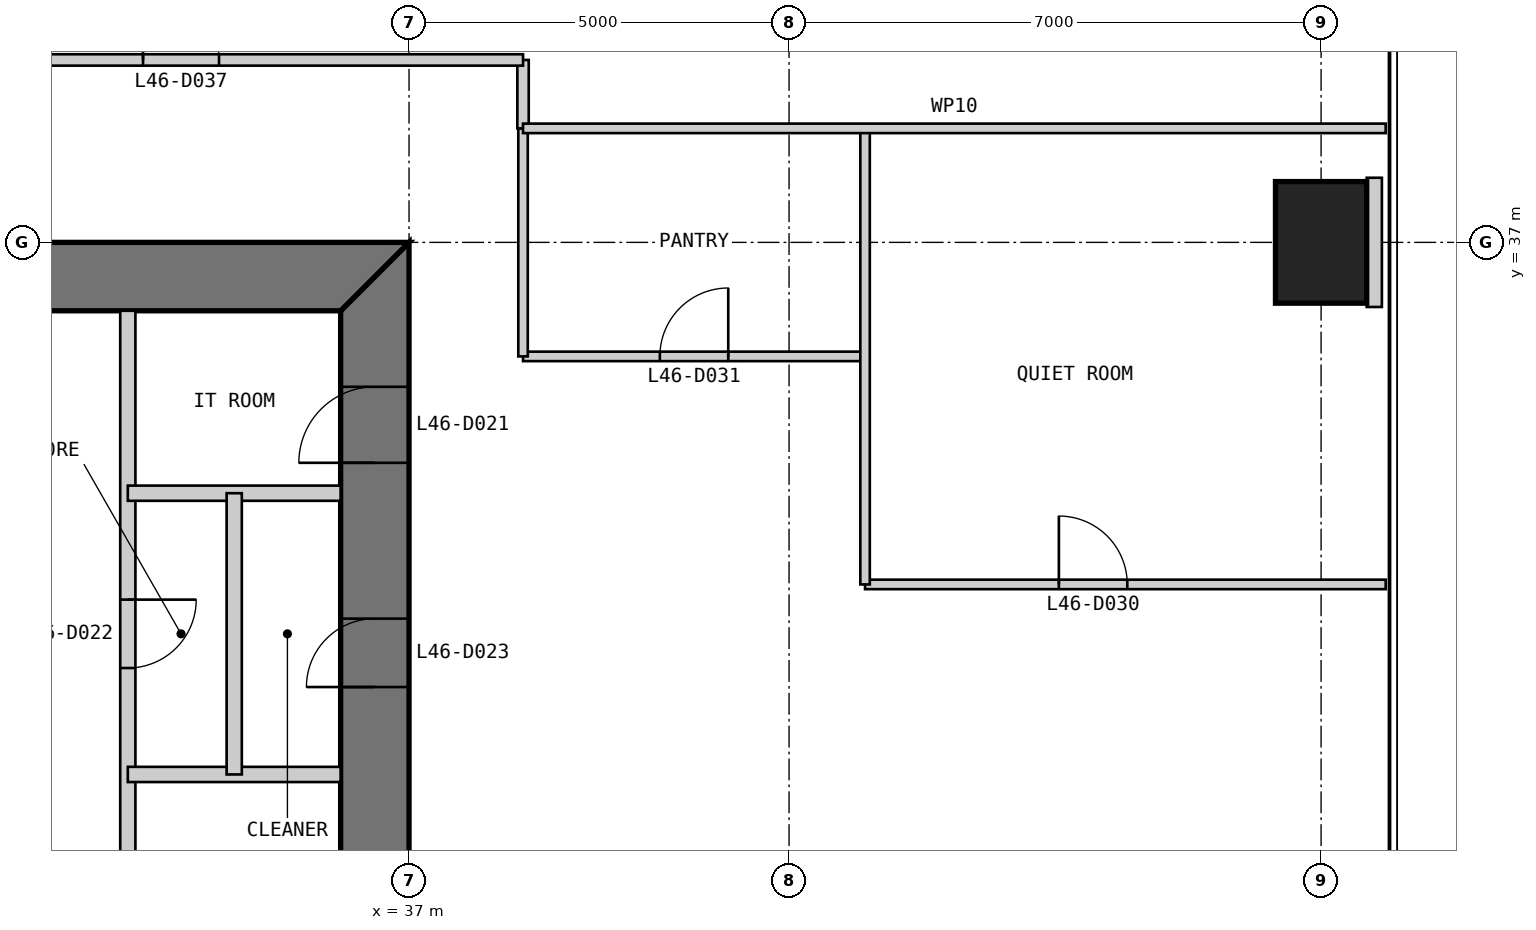
"""IFC4 building model, lengths in metres.
Left out: names, types, materials, properties, quantities, classifications, styles, units other than length and angle.
Written with IfcOpenShell. Run it as: python <this file> out.ifc"""

import sys

from ifc_helpers import new_model, si_unit, direction, frame, frame_2d, origin, origin_2d, place, context, subcontext, project, spatial, polyline, rectangle, outline, extrude, element, fill, save


model = new_model("IFC4")
c1 = context("Model", 3, precision=1e-05, world=origin(), true_north=direction((0.0, 1.0)))
c2 = subcontext(c1, "Body", "Model", "MODEL_VIEW")
j1 = project(units=[si_unit("LENGTHUNIT", "METRE"), si_unit("PLANEANGLEUNIT", "RADIAN")], contexts=[c1])
p1 = place(None, origin())
s1 = spatial("IfcSite", under=j1, at=p1, CompositionType="ELEMENT")
p2 = place(p1, origin())
s2 = spatial("IfcBuilding", under=s1, at=p2, CompositionType="ELEMENT")
p3 = place(p2, frame((0.0, 0.0, 197.8)))
s3 = spatial("IfcBuildingStorey", under=s2, at=p3, CompositionType="ELEMENT", Elevation=197.8)
p4 = place(p3, frame((49.0, 37.0, 0.0), z_axis=(0.0, 0.0, 1.0), x_axis=(1.0, 0.0, 0.0)))
e1 = element("IfcColumn", 1, at=p4, inside=s3, PredefinedType="COLUMN", context=c2, shape_type="SweptSolid", body=[
    extrude(rectangle(XDim=1.2, YDim=1.6, at=origin_2d()), origin(), (0.0, 0.0, 1.0), 4.0),
])
p5 = place(p3, frame((36.55, 13.9, 0.0), z_axis=(0.0, 0.0, 1.0), x_axis=(0.0, 1.0, 0.0)))
e2 = element("IfcWall", 2, at=p5, inside=s3, PredefinedType="SHEAR", context=c2, shape_type="SweptSolid", body=[
    extrude(outline(polyline([(-0.9, -0.45), (23.1, -0.45), (22.2, 0.45), (0.0, 0.45), (-0.9, -0.45)])), origin(), (0.0, 0.0, 1.0), 4.0),
])
p6 = place(p5, frame((20.2, 0.0, 0.0)))
e3 = element("IfcOpeningElement", 3, at=p6, cuts=e2, PredefinedType="OPENING", context=c2, shape_type="SweptSolid", body=[
    extrude(rectangle(XDim=1.0, YDim=2.2, at=frame_2d((0.5, 1.1))), frame((0.0, 0.46, 0.0), z_axis=(0.0, -1.0, 0.0), x_axis=(1.0, 0.0, 0.0)), (0.0, 0.0, 1.0), 0.92),
])
p7 = place(p5, frame((17.25, 0.0, 0.0)))
e4 = element("IfcOpeningElement", 4, at=p7, cuts=e2, PredefinedType="OPENING", context=c2, shape_type="SweptSolid", body=[
    extrude(rectangle(XDim=0.9, YDim=2.2, at=frame_2d((0.45, 1.1))), frame((0.0, 0.46, 0.0), z_axis=(0.0, -1.0, 0.0), x_axis=(1.0, 0.0, 0.0)), (0.0, 0.0, 1.0), 0.92),
])
p8 = place(p3, frame((37.0, 36.55, 0.0), z_axis=(0.0, 0.0, 1.0), x_axis=(-1.0, 0.0, 0.0)))
e5 = element("IfcWall", 5, at=p8, inside=s3, PredefinedType="SHEAR", context=c2, shape_type="SweptSolid", body=[
    extrude(outline(polyline([(0.0, -0.45), (24.0, -0.45), (23.1, 0.45), (0.9, 0.45), (0.0, -0.45)])), origin(), (0.0, 0.0, 1.0), 4.0),
])
p9 = place(p8, frame((4.9, 0.0, 0.0)))
e6 = element("IfcOpeningElement", 6, at=p9, cuts=e5, PredefinedType="OPENING", context=c2, shape_type="SweptSolid", body=[
    extrude(rectangle(XDim=1.0, YDim=2.2, at=frame_2d((0.5, 1.1))), frame((0.0, 0.46, 0.0), z_axis=(0.0, -1.0, 0.0), x_axis=(1.0, 0.0, 0.0)), (0.0, 0.0, 1.0), 0.92),
])
p10 = place(p8, frame((8.9, 0.0, 0.0)))
e7 = element("IfcOpeningElement", 7, at=p10, cuts=e5, PredefinedType="OPENING", context=c2, shape_type="SweptSolid", body=[
    extrude(rectangle(XDim=1.1, YDim=2.2, at=frame_2d((0.55, 1.1))), frame((0.0, 0.46, 0.0), z_axis=(0.0, -1.0, 0.0), x_axis=(1.0, 0.0, 0.0)), (0.0, 0.0, 1.0), 0.92),
])
p11 = place(p8, frame((15.05, 0.0, 0.0)))
e8 = element("IfcOpeningElement", 8, at=p11, cuts=e5, PredefinedType="OPENING", context=c2, shape_type="SweptSolid", body=[
    extrude(rectangle(XDim=0.9, YDim=2.2, at=frame_2d((0.45, 1.1))), frame((0.0, 0.46, 0.0), z_axis=(0.0, -1.0, 0.0), x_axis=(1.0, 0.0, 0.0)), (0.0, 0.0, 1.0), 0.92),
])
p12 = place(p8, frame((17.9, 0.0, 0.0)))
e9 = element("IfcOpeningElement", 9, at=p12, cuts=e5, PredefinedType="OPENING", context=c2, shape_type="SweptSolid", body=[
    extrude(rectangle(XDim=1.0, YDim=2.2, at=frame_2d((0.5, 1.1))), frame((0.0, 0.46, 0.0), z_axis=(0.0, -1.0, 0.0), x_axis=(1.0, 0.0, 0.0)), (0.0, 0.0, 1.0), 0.92),
])
p13 = place(p8, frame((21.4, 0.0, 0.0)))
e10 = element("IfcOpeningElement", 10, at=p13, cuts=e5, PredefinedType="OPENING", context=c2, shape_type="SweptSolid", body=[
    extrude(rectangle(XDim=1.0, YDim=2.2, at=frame_2d((0.5, 1.1))), frame((0.0, 0.46, 0.0), z_axis=(0.0, -1.0, 0.0), x_axis=(1.0, 0.0, 0.0)), (0.0, 0.0, 1.0), 0.92),
])
p14 = place(p3, frame((33.3, 36.1, 0.0), z_axis=(0.0, 0.0, 1.0), x_axis=(0.0, -1.0, 0.0)))
e11 = element("IfcWall", 11, at=p14, inside=s3, PredefinedType="PARTITIONING", context=c2, shape_type="SweptSolid", body=[
    extrude(rectangle(XDim=16.1, YDim=0.2, at=frame_2d((8.05, 0.0))), origin(), (0.0, 0.0, 1.0), 3.8),
])
p15 = place(p14, frame((3.8, 0.0, 0.0)))
e12 = element("IfcOpeningElement", 12, at=p15, cuts=e11, PredefinedType="OPENING", context=c2, shape_type="SweptSolid", body=[
    extrude(rectangle(XDim=0.9, YDim=2.2, at=frame_2d((0.45, 1.1))), frame((0.0, 0.11, 0.0), z_axis=(0.0, -1.0, 0.0), x_axis=(1.0, 0.0, 0.0)), (0.0, 0.0, 1.0), 0.22),
])
for number, where, z_axis, x_axis in (
    (13, (36.1, 30.0, 0.0), (0.0, 0.0, 1.0), (-1.0, 0.0, 0.0)),
    (14, (36.1, 33.7, 0.0), (0.0, 0.0, 1.0), (-1.0, 0.0, 0.0)),
):
    element("IfcWall", number, at=place(p3, frame(where, z_axis=z_axis, x_axis=x_axis)), inside=s3, PredefinedType="PARTITIONING", context=c2, shape_type="SweptSolid", body=[
        extrude(rectangle(XDim=2.8, YDim=0.2, at=frame_2d((1.4, 0.0))), origin(), (0.0, 0.0, 1.0), 3.8),
    ])
p16 = place(p3, frame((34.7, 33.7, 0.0), z_axis=(0.0, 0.0, 1.0), x_axis=(0.0, -1.0, 0.0)))
e15 = element("IfcWall", 15, at=p16, inside=s3, PredefinedType="PARTITIONING", context=c2, shape_type="SweptSolid", body=[
    extrude(rectangle(XDim=3.7, YDim=0.2, at=frame_2d((1.85, 0.0))), origin(), (0.0, 0.0, 1.0), 3.8),
])
p17 = place(p3, frame((49.85, 32.5, 0.0), z_axis=(0.0, 0.0, 1.0), x_axis=(-1.0, 0.0, 0.0)))
e16 = element("IfcWall", 16, at=p17, inside=s3, PredefinedType="PARTITIONING", context=c2, shape_type="SweptSolid", body=[
    extrude(rectangle(XDim=6.85, YDim=0.125, at=frame_2d((3.425, 0.0))), origin(), (0.0, 0.0, 1.0), 3.85),
])
p18 = place(p17, frame((3.4, 0.0, 0.0)))
e17 = element("IfcOpeningElement", 17, at=p18, cuts=e16, PredefinedType="OPENING", context=c2, shape_type="SweptSolid", body=[
    extrude(rectangle(XDim=0.9, YDim=2.2, at=frame_2d((0.45, 1.1))), frame((0.0, 0.073, 0.0), z_axis=(0.0, -1.0, 0.0), x_axis=(1.0, 0.0, 0.0)), (0.0, 0.0, 1.0), 0.145),
])
p19 = place(p3, frame((43.0, 35.5, 0.0), z_axis=(0.0, 0.0, 1.0), x_axis=(-1.0, 0.0, 0.0)))
e18 = element("IfcWall", 18, at=p19, inside=s3, PredefinedType="PARTITIONING", context=c2, shape_type="SweptSolid", body=[
    extrude(rectangle(XDim=4.5, YDim=0.125, at=frame_2d((2.25, 0.0))), origin(), (0.0, 0.0, 1.0), 3.85),
])
p20 = place(p19, frame((1.8, 0.0, 0.0)))
e19 = element("IfcOpeningElement", 19, at=p20, cuts=e18, PredefinedType="OPENING", context=c2, shape_type="SweptSolid", body=[
    extrude(rectangle(XDim=0.9, YDim=2.2, at=frame_2d((0.45, 1.1))), frame((0.0, 0.073, 0.0), z_axis=(0.0, -1.0, 0.0), x_axis=(1.0, 0.0, 0.0)), (0.0, 0.0, 1.0), 0.145),
])
p21 = place(p3, frame((43.0, 32.5, 0.0), z_axis=(0.0, 0.0, 1.0), x_axis=(0.0, 1.0, 0.0)))
e20 = element("IfcWall", 20, at=p21, inside=s3, PredefinedType="PARTITIONING", context=c2, shape_type="SweptSolid", body=[
    extrude(rectangle(XDim=6.0, YDim=0.125, at=frame_2d((3.0, 0.0))), origin(), (0.0, 0.0, 1.0), 3.238),
])
p22 = place(p3, frame((38.5, 35.5, 0.0), z_axis=(0.0, 0.0, 1.0), x_axis=(0.0, 1.0, 0.0)))
e21 = element("IfcWall", 21, at=p22, inside=s3, PredefinedType="PARTITIONING", context=c2, shape_type="SweptSolid", body=[
    extrude(rectangle(XDim=3.0, YDim=0.125, at=frame_2d((1.5, 0.0))), origin(), (0.0, 0.0, 1.0), 3.85),
])
p23 = place(p3, frame((38.5, 38.5, 0.0), z_axis=(0.0, 0.0, 1.0), x_axis=(0.0, 1.0, 0.0)))
e22 = element("IfcWall", 22, at=p23, inside=s3, PredefinedType="PARTITIONING", context=c2, shape_type="SweptSolid", body=[
    extrude(rectangle(XDim=0.9, YDim=0.15, at=frame_2d((0.45, 0.0))), origin(), (0.0, 0.0, 1.0), 3.85),
])
p24 = place(p3, frame((38.5, 39.4, 0.0), z_axis=(0.0, 0.0, 1.0), x_axis=(-1.0, 0.0, 0.0)))
e23 = element("IfcWall", 23, at=p24, inside=s3, PredefinedType="PARTITIONING", context=c2, shape_type="SweptSolid", body=[
    extrude(rectangle(XDim=27.9, YDim=0.15, at=frame_2d((13.95, 0.0))), origin(), (0.0, 0.0, 1.0), 3.85),
])
p25 = place(p24, frame((9.25, 0.0, 0.0)))
e24 = element("IfcOpeningElement", 24, at=p25, cuts=e23, PredefinedType="OPENING", context=c2, shape_type="SweptSolid", body=[
    extrude(rectangle(XDim=1.0, YDim=2.2, at=frame_2d((0.5, 1.1))), frame((0.0, 0.085, 0.0), z_axis=(0.0, -1.0, 0.0), x_axis=(1.0, 0.0, 0.0)), (0.0, 0.0, 1.0), 0.17),
])
p26 = place(p24, frame((16.75, 0.0, 0.0)))
e25 = element("IfcOpeningElement", 25, at=p26, cuts=e23, PredefinedType="OPENING", context=c2, shape_type="SweptSolid", body=[
    extrude(rectangle(XDim=1.0, YDim=2.2, at=frame_2d((0.5, 1.1))), frame((0.0, 0.085, 0.0), z_axis=(0.0, -1.0, 0.0), x_axis=(1.0, 0.0, 0.0)), (0.0, 0.0, 1.0), 0.17),
])
p27 = place(p24, frame((4.0, 0.0, 0.0)))
e26 = element("IfcOpeningElement", 26, at=p27, cuts=e23, PredefinedType="OPENING", context=c2, shape_type="SweptSolid", body=[
    extrude(rectangle(XDim=1.0, YDim=2.2, at=frame_2d((0.5, 1.1))), frame((0.0, 0.085, 0.0), z_axis=(0.0, -1.0, 0.0), x_axis=(1.0, 0.0, 0.0)), (0.0, 0.0, 1.0), 0.17),
])
p28 = place(p24, frame((22.0, 0.0, 0.0)))
e27 = element("IfcOpeningElement", 27, at=p28, cuts=e23, PredefinedType="OPENING", context=c2, shape_type="SweptSolid", body=[
    extrude(rectangle(XDim=1.0, YDim=2.2, at=frame_2d((0.5, 1.1))), frame((0.0, 0.085, 0.0), z_axis=(0.0, -1.0, 0.0), x_axis=(1.0, 0.0, 0.0)), (0.0, 0.0, 1.0), 0.17),
])
p29 = place(p24, frame((25.0, 0.0, 0.0)))
e28 = element("IfcOpeningElement", 28, at=p29, cuts=e23, PredefinedType="OPENING", context=c2, shape_type="SweptSolid", body=[
    extrude(rectangle(XDim=1.0, YDim=2.2, at=frame_2d((0.5, 1.1))), frame((0.0, 0.085, 0.0), z_axis=(0.0, -1.0, 0.0), x_axis=(1.0, 0.0, 0.0)), (0.0, 0.0, 1.0), 0.17),
])
p30 = place(p3, frame((49.85, 38.5, 0.0), z_axis=(0.0, 0.0, 1.0), x_axis=(-1.0, 0.0, 0.0)))
e29 = element("IfcWall", 29, at=p30, inside=s3, PredefinedType="PARTITIONING", context=c2, shape_type="SweptSolid", body=[
    extrude(rectangle(XDim=11.35, YDim=0.125, at=frame_2d((5.675, 0.0))), origin(), (0.0, 0.0, 1.0), 3.85),
])
p31 = place(p3, frame((49.8, 37.0, 0.0), z_axis=(0.0, 0.0, 1.0), x_axis=(-1.0, 0.0, 0.0)))
e30 = element("IfcWall", 30, at=p31, inside=s3, PredefinedType="PARTITIONING", context=c2, shape_type="SweptSolid", body=[
    extrude(rectangle(XDim=0.2, YDim=1.7, at=frame_2d((0.1, 0.0))), origin(), (0.0, 0.0, 1.0), 3.85),
])
p32 = place(p6, origin())
e31 = element("IfcDoor", 31, at=p32, inside=s3, OperationType="SINGLE_SWING_LEFT", PredefinedType="DOOR", context=c2, shape_type="SweptSolid", body=[
    extrude(rectangle(XDim=1.0, YDim=2.2, at=frame_2d((0.5, 1.1))), frame((0.0, 0.025, 0.0), z_axis=(0.0, -1.0, 0.0), x_axis=(1.0, 0.0, 0.0)), (0.0, 0.0, 1.0), 0.05),
    extrude(outline(polyline([(0.0, 0.0), (0.04, 0.0), (0.04, 2.16), (0.96, 2.16), (0.96, 0.0), (1.0, 0.0), (1.0, 2.2), (0.0, 2.2), (0.0, 0.0)])), frame((0.0, 0.3, 0.0), z_axis=(0.0, -1.0, 0.0), x_axis=(1.0, 0.0, 0.0)), (0.0, 0.0, 1.0), 0.6),
])
fill(e3, e31)
p33 = place(p15, origin())
e32 = element("IfcDoor", 32, at=p33, inside=s3, OperationType="SINGLE_SWING_LEFT", PredefinedType="DOOR", context=c2, shape_type="SweptSolid", body=[
    extrude(rectangle(XDim=0.9, YDim=2.2, at=frame_2d((0.45, 1.1))), frame((0.0, 0.025, 0.0), z_axis=(0.0, -1.0, 0.0), x_axis=(1.0, 0.0, 0.0)), (0.0, 0.0, 1.0), 0.05),
])
fill(e12, e32)
p34 = place(p7, origin())
e33 = element("IfcDoor", 33, at=p34, inside=s3, OperationType="SINGLE_SWING_LEFT", PredefinedType="DOOR", context=c2, shape_type="SweptSolid", body=[
    extrude(rectangle(XDim=0.9, YDim=2.2, at=frame_2d((0.45, 1.1))), frame((0.0, 0.025, 0.0), z_axis=(0.0, -1.0, 0.0), x_axis=(1.0, 0.0, 0.0)), (0.0, 0.0, 1.0), 0.05),
    extrude(outline(polyline([(0.0, 0.0), (0.04, 0.0), (0.04, 2.16), (0.86, 2.16), (0.86, 0.0), (0.9, 0.0), (0.9, 2.2), (0.0, 2.2), (0.0, 0.0)])), frame((0.0, 0.3, 0.0), z_axis=(0.0, -1.0, 0.0), x_axis=(1.0, 0.0, 0.0)), (0.0, 0.0, 1.0), 0.6),
])
fill(e4, e33)
p35 = place(p18, frame((0.9, 0.0, 0.0), z_axis=(0.0, 0.0, 1.0), x_axis=(-1.0, 0.0, 0.0)))
e34 = element("IfcDoor", 34, at=p35, inside=s3, OperationType="SINGLE_SWING_LEFT", PredefinedType="DOOR", context=c2, shape_type="SweptSolid", body=[
    extrude(rectangle(XDim=0.9, YDim=2.2, at=frame_2d((0.45, 1.1))), frame((0.0, 0.025, 0.0), z_axis=(0.0, -1.0, 0.0), x_axis=(1.0, 0.0, 0.0)), (0.0, 0.0, 1.0), 0.05),
])
fill(e17, e34)
p36 = place(p20, frame((0.9, 0.0, 0.0), z_axis=(0.0, 0.0, 1.0), x_axis=(-1.0, 0.0, 0.0)))
e35 = element("IfcDoor", 35, at=p36, inside=s3, OperationType="SINGLE_SWING_RIGHT", PredefinedType="DOOR", context=c2, shape_type="SweptSolid", body=[
    extrude(rectangle(XDim=0.9, YDim=2.2, at=frame_2d((0.45, 1.1))), frame((0.0, 0.025, 0.0), z_axis=(0.0, -1.0, 0.0), x_axis=(1.0, 0.0, 0.0)), (0.0, 0.0, 1.0), 0.05),
])
fill(e19, e35)
p37 = place(p27, frame((1.0, 0.0, 0.0), z_axis=(0.0, 0.0, 1.0), x_axis=(-1.0, 0.0, 0.0)))
e36 = element("IfcDoor", 36, at=p37, inside=s3, OperationType="SINGLE_SWING_LEFT", PredefinedType="DOOR", context=c2, shape_type="SweptSolid", body=[
    extrude(rectangle(XDim=1.0, YDim=2.2, at=frame_2d((0.5, 1.1))), frame((0.0, 0.025, 0.0), z_axis=(0.0, -1.0, 0.0), x_axis=(1.0, 0.0, 0.0)), (0.0, 0.0, 1.0), 0.05),
])
fill(e26, e36)
save(model, sys.argv[1])
